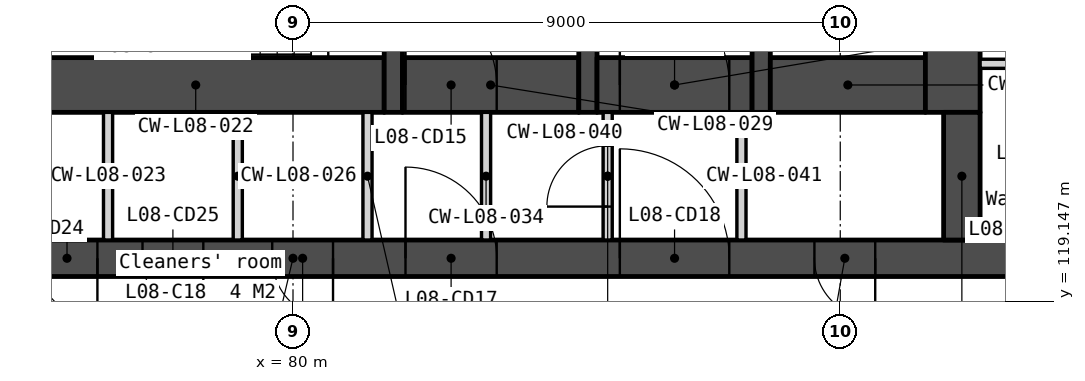
"""IFC4 building model, lengths in metres.
Left out: names, types, materials, properties, quantities, classifications, styles, units other than length and angle.
Written with IfcOpenShell. Run it as: python <this file> out.ifc"""

import sys

from ifc_helpers import new_model, si_unit, direction, frame, frame_2d, origin, place, context, subcontext, project, spatial, polyline, rectangle, outline, extrude, element, fill, save


model = new_model("IFC4")
c1 = context("Model", 3, precision=1e-05, world=origin(), true_north=direction((0.0, 1.0)))
c2 = subcontext(c1, "Body", "Model", "MODEL_VIEW")
j1 = project(units=[si_unit("LENGTHUNIT", "METRE"), si_unit("PLANEANGLEUNIT", "RADIAN")], contexts=[c1])
p1 = place(None, origin())
s1 = spatial("IfcSite", under=j1, at=p1, CompositionType="ELEMENT")
p2 = place(p1, origin())
s2 = spatial("IfcBuilding", under=s1, at=p2, CompositionType="ELEMENT")
p3 = place(p2, frame((0.0, 0.0, 42.0)))
s3 = spatial("IfcBuildingStorey", under=s2, at=p3, CompositionType="ELEMENT", Elevation=42.0)
p4 = place(p3, frame((66.0, 119.85, 0.0), z_axis=(0.0, 0.0, 1.0), x_axis=(1.0, 0.0, 0.0)))
e1 = element("IfcWall", 1, at=p4, inside=s3, PredefinedType="SOLIDWALL", context=c2, shape_type="SweptSolid", body=[
    extrude(rectangle(XDim=28.0, YDim=0.6, at=frame_2d((14.0, 0.0))), origin(), (0.0, 0.0, 1.0), 3.35),
])
p5 = place(p4, frame((6.825, 0.0, 0.0)))
e2 = element("IfcOpeningElement", 2, at=p5, cuts=e1, PredefinedType="OPENING", context=c2, shape_type="SweptSolid", body=[
    extrude(rectangle(XDim=1.8, YDim=2.1, at=frame_2d((0.9, 1.05))), frame((0.0, 0.31, 0.0), z_axis=(0.0, -1.0, 0.0), x_axis=(1.0, 0.0, 0.0)), (0.0, 0.0, 1.0), 0.62),
])
p6 = place(p4, frame((15.85, 0.0, 0.0)))
e3 = element("IfcOpeningElement", 3, at=p6, cuts=e1, PredefinedType="OPENING", context=c2, shape_type="SweptSolid", body=[
    extrude(rectangle(XDim=1.5, YDim=2.1, at=frame_2d((0.75, 1.05))), frame((0.0, 0.31, 0.0), z_axis=(0.0, -1.0, 0.0), x_axis=(1.0, 0.0, 0.0)), (0.0, 0.0, 1.0), 0.62),
])
p7 = place(p4, frame((19.375, 0.0, 0.0)))
e4 = element("IfcOpeningElement", 4, at=p7, cuts=e1, PredefinedType="OPENING", context=c2, shape_type="SweptSolid", body=[
    extrude(rectangle(XDim=1.8, YDim=2.1, at=frame_2d((0.9, 1.05))), frame((0.0, 0.31, 0.0), z_axis=(0.0, -1.0, 0.0), x_axis=(1.0, 0.0, 0.0)), (0.0, 0.0, 1.0), 0.62),
])
p8 = place(p4, frame((4.425, 0.0, 0.0)))
e5 = element("IfcOpeningElement", 5, at=p8, cuts=e1, PredefinedType="OPENING", context=c2, shape_type="SweptSolid", body=[
    extrude(rectangle(XDim=1.0, YDim=2.1, at=frame_2d((0.5, 1.05))), frame((0.0, 0.31, 0.0), z_axis=(0.0, -1.0, 0.0), x_axis=(1.0, 0.0, 0.0)), (0.0, 0.0, 1.0), 0.62),
])
p9 = place(p4, frame((9.783, 0.0, 0.0)))
e6 = element("IfcOpeningElement", 6, at=p9, cuts=e1, PredefinedType="OPENING", context=c2, shape_type="SweptSolid", body=[
    extrude(rectangle(XDim=1.0, YDim=2.1, at=frame_2d((0.5, 1.05))), frame((0.0, 0.31, 0.0), z_axis=(0.0, -1.0, 0.0), x_axis=(1.0, 0.0, 0.0)), (0.0, 0.0, 1.0), 0.62),
])
p10 = place(p4, frame((11.525, 0.0, 0.0)))
e7 = element("IfcOpeningElement", 7, at=p10, cuts=e1, PredefinedType="OPENING", context=c2, shape_type="SweptSolid", body=[
    extrude(rectangle(XDim=1.0, YDim=2.1, at=frame_2d((0.5, 1.05))), frame((0.0, 0.31, 0.0), z_axis=(0.0, -1.0, 0.0), x_axis=(1.0, 0.0, 0.0)), (0.0, 0.0, 1.0), 0.62),
])
p11 = place(p4, frame((13.658, 0.0, 0.0)))
e8 = element("IfcOpeningElement", 8, at=p11, cuts=e1, PredefinedType="OPENING", context=c2, shape_type="SweptSolid", body=[
    extrude(rectangle(XDim=1.0, YDim=2.1, at=frame_2d((0.5, 1.05))), frame((0.0, 0.31, 0.0), z_axis=(0.0, -1.0, 0.0), x_axis=(1.0, 0.0, 0.0)), (0.0, 0.0, 1.0), 0.62),
])
p12 = place(p4, frame((22.575, 0.0, 0.0)))
e9 = element("IfcOpeningElement", 9, at=p12, cuts=e1, PredefinedType="OPENING", context=c2, shape_type="SweptSolid", body=[
    extrude(rectangle(XDim=1.0, YDim=2.1, at=frame_2d((0.5, 1.05))), frame((0.0, 0.31, 0.0), z_axis=(0.0, -1.0, 0.0), x_axis=(1.0, 0.0, 0.0)), (0.0, 0.0, 1.0), 0.62),
])
p13 = place(p3, frame((75.3, 122.7, 0.0), z_axis=(0.0, 0.0, 1.0), x_axis=(1.0, 0.0, 0.0)))
e10 = element("IfcWall", 10, at=p13, inside=s3, PredefinedType="SOLIDWALL", context=c2, shape_type="SweptSolid", body=[
    extrude(rectangle(XDim=6.2, YDim=0.9, at=frame_2d((3.1, 0.0))), origin(), (0.0, 0.0, 1.0), 3.35),
])
for number, where, z_axis, x_axis in (
    (11, (76.958, 122.25, 0.0), (0.0, 0.0, 1.0), (0.0, -1.0, 0.0)),
    (12, (79.092, 122.25, 0.0), (0.0, 0.0, 1.0), (0.0, -1.0, 0.0)),
    (13, (81.225, 122.25, 0.0), (0.0, 0.0, 1.0), (0.0, -1.0, 0.0)),
):
    element("IfcWall", number, at=place(p3, frame(where, z_axis=z_axis, x_axis=x_axis)), inside=s3, PredefinedType="PARTITIONING", context=c2, shape_type="SweptSolid", body=[
        extrude(rectangle(XDim=2.1, YDim=0.15, at=frame_2d((1.05, 0.0))), origin(), (0.0, 0.0, 1.0), 3.35),
    ])
p14 = place(p3, frame((81.65, 125.7, 0.0), z_axis=(0.0, 0.0, 1.0), x_axis=(0.0, -1.0, 0.0)))
e14 = element("IfcWall", 14, at=p14, inside=s3, PredefinedType="SOLIDWALL", context=c2, shape_type="SweptSolid", body=[
    extrude(rectangle(XDim=3.45, YDim=0.3, at=frame_2d((1.725, 0.0))), origin(), (0.0, 0.0, 1.0), 3.35),
])
p15 = place(p14, frame((0.75, 0.0, 0.0)))
e15 = element("IfcOpeningElement", 15, at=p15, cuts=e14, PredefinedType="OPENING", context=c2, shape_type="SweptSolid", body=[
    extrude(rectangle(XDim=1.0, YDim=2.1, at=frame_2d((0.5, 1.05))), frame((0.0, 0.16, 0.0), z_axis=(0.0, -1.0, 0.0), x_axis=(1.0, 0.0, 0.0)), (0.0, 0.0, 1.0), 0.32),
])
p16 = place(p3, frame((81.8, 122.7, 0.0), z_axis=(0.0, 0.0, 1.0), x_axis=(1.0, 0.0, 0.0)))
e16 = element("IfcWall", 16, at=p16, inside=s3, PredefinedType="SOLIDWALL", context=c2, shape_type="SweptSolid", body=[
    extrude(rectangle(XDim=2.9, YDim=0.9, at=frame_2d((1.45, 0.0))), origin(), (0.0, 0.0, 1.0), 3.35),
])
p17 = place(p16, frame((0.05, 0.0, 0.0)))
e17 = element("IfcOpeningElement", 17, at=p17, cuts=e16, PredefinedType="OPENING", context=c2, shape_type="SweptSolid", body=[
    extrude(rectangle(XDim=1.5, YDim=2.1, at=frame_2d((0.75, 1.05))), frame((0.0, 0.46, 0.0), z_axis=(0.0, -1.0, 0.0), x_axis=(1.0, 0.0, 0.0)), (0.0, 0.0, 1.0), 0.92),
])
p18 = place(p3, frame((83.175, 122.25, 0.0), z_axis=(0.0, 0.0, 1.0), x_axis=(0.0, -1.0, 0.0)))
e18 = element("IfcWall", 18, at=p18, inside=s3, PredefinedType="PARTITIONING", context=c2, shape_type="SweptSolid", body=[
    extrude(rectangle(XDim=2.1, YDim=0.15, at=frame_2d((1.05, 0.0))), origin(), (0.0, 0.0, 1.0), 3.35),
])
p19 = place(p3, frame((84.85, 133.95, 0.0), z_axis=(0.0, 0.0, 1.0), x_axis=(0.0, -1.0, 0.0)))
e19 = element("IfcWall", 19, at=p19, inside=s3, PredefinedType="SOLIDWALL", context=c2, shape_type="SweptSolid", body=[
    extrude(rectangle(XDim=11.7, YDim=0.3, at=frame_2d((5.85, 0.0))), origin(), (0.0, 0.0, 1.0), 3.35),
])
p20 = place(p3, frame((85.0, 122.7, 0.0), z_axis=(0.0, 0.0, 1.0), x_axis=(1.0, 0.0, 0.0)))
e20 = element("IfcWall", 20, at=p20, inside=s3, PredefinedType="SOLIDWALL", context=c2, shape_type="SweptSolid", body=[
    extrude(rectangle(XDim=2.55, YDim=0.9, at=frame_2d((1.275, 0.0))), origin(), (0.0, 0.0, 1.0), 3.35),
])
p21 = place(p20, frame((0.375, 0.0, 0.0)))
e21 = element("IfcOpeningElement", 21, at=p21, cuts=e20, PredefinedType="OPENING", context=c2, shape_type="SweptSolid", body=[
    extrude(rectangle(XDim=1.8, YDim=2.1, at=frame_2d((0.9, 1.05))), frame((0.0, 0.46, 0.0), z_axis=(0.0, -1.0, 0.0), x_axis=(1.0, 0.0, 0.0)), (0.0, 0.0, 1.0), 0.92),
])
p22 = place(p3, frame((85.175, 122.25, 0.0), z_axis=(0.0, 0.0, 1.0), x_axis=(0.0, -1.0, 0.0)))
e22 = element("IfcWall", 22, at=p22, inside=s3, PredefinedType="PARTITIONING", context=c2, shape_type="SweptSolid", body=[
    extrude(rectangle(XDim=2.1, YDim=0.15, at=frame_2d((1.05, 0.0))), origin(), (0.0, 0.0, 1.0), 3.35),
])
p23 = place(p22, frame((0.55, 0.0, 0.0)))
e23 = element("IfcOpeningElement", 23, at=p23, cuts=e22, PredefinedType="OPENING", context=c2, shape_type="SweptSolid", body=[
    extrude(rectangle(XDim=1.0, YDim=2.1, at=frame_2d((0.5, 1.05))), frame((0.0, 0.085, 0.0), z_axis=(0.0, -1.0, 0.0), x_axis=(1.0, 0.0, 0.0)), (0.0, 0.0, 1.0), 0.17),
])
p24 = place(p3, frame((87.375, 122.25, 0.0), z_axis=(0.0, 0.0, 1.0), x_axis=(0.0, -1.0, 0.0)))
e24 = element("IfcWall", 24, at=p24, inside=s3, PredefinedType="PARTITIONING", context=c2, shape_type="SweptSolid", body=[
    extrude(rectangle(XDim=2.1, YDim=0.15, at=frame_2d((1.05, 0.0))), origin(), (0.0, 0.0, 1.0), 3.35),
])
p25 = place(p3, frame((87.7, 133.95, 0.0), z_axis=(0.0, 0.0, 1.0), x_axis=(0.0, -1.0, 0.0)))
e25 = element("IfcWall", 25, at=p25, inside=s3, PredefinedType="SOLIDWALL", context=c2, shape_type="SweptSolid", body=[
    extrude(rectangle(XDim=11.7, YDim=0.3, at=frame_2d((5.85, 0.0))), origin(), (0.0, 0.0, 1.0), 3.35),
])
p26 = place(p25, frame((6.95, 0.0, 0.0)))
e26 = element("IfcOpeningElement", 26, at=p26, cuts=e25, PredefinedType="OPENING", context=c2, shape_type="SweptSolid", body=[
    extrude(rectangle(XDim=1.1, YDim=2.1, at=frame_2d((0.55, 1.05))), frame((0.0, 0.16, 0.0), z_axis=(0.0, -1.0, 0.0), x_axis=(1.0, 0.0, 0.0)), (0.0, 0.0, 1.0), 0.32),
])
p27 = place(p25, frame((5.1, 0.0, 0.0)))
e27 = element("IfcOpeningElement", 27, at=p27, cuts=e25, PredefinedType="OPENING", context=c2, shape_type="SweptSolid", body=[
    extrude(rectangle(XDim=1.0, YDim=2.1, at=frame_2d((0.5, 1.05))), frame((0.0, 0.16, 0.0), z_axis=(0.0, -1.0, 0.0), x_axis=(1.0, 0.0, 0.0)), (0.0, 0.0, 1.0), 0.32),
])
p28 = place(p25, frame((9.25, 0.0, 0.0)))
e28 = element("IfcOpeningElement", 28, at=p28, cuts=e25, PredefinedType="OPENING", context=c2, shape_type="SweptSolid", body=[
    extrude(rectangle(XDim=1.1, YDim=2.1, at=frame_2d((0.55, 1.05))), frame((0.0, 0.16, 0.0), z_axis=(0.0, -1.0, 0.0), x_axis=(1.0, 0.0, 0.0)), (0.0, 0.0, 1.0), 0.32),
])
p29 = place(p3, frame((87.85, 122.7, 0.0), z_axis=(0.0, 0.0, 1.0), x_axis=(1.0, 0.0, 0.0)))
e29 = element("IfcWall", 29, at=p29, inside=s3, PredefinedType="SOLIDWALL", context=c2, shape_type="SweptSolid", body=[
    extrude(rectangle(XDim=2.55, YDim=0.9, at=frame_2d((1.275, 0.0))), origin(), (0.0, 0.0, 1.0), 3.35),
])
p30 = place(p3, frame((90.85, 133.95, 0.0), z_axis=(0.0, 0.0, 1.0), x_axis=(0.0, -1.0, 0.0)))
e30 = element("IfcWall", 30, at=p30, inside=s3, PredefinedType="SOLIDWALL", context=c2, shape_type="SweptSolid", body=[
    extrude(rectangle(XDim=11.7, YDim=0.9, at=frame_2d((5.85, 0.0))), origin(), (0.0, 0.0, 1.0), 3.35),
])
p31 = place(p3, frame((91.0, 122.25, 0.0), z_axis=(0.0, 0.0, 1.0), x_axis=(0.0, -1.0, 0.0)))
e31 = element("IfcWall", 31, at=p31, inside=s3, PredefinedType="SOLIDWALL", context=c2, shape_type="SweptSolid", body=[
    extrude(rectangle(XDim=2.1, YDim=0.6, at=frame_2d((1.05, 0.0))), origin(), (0.0, 0.0, 1.0), 3.35),
])
p32 = place(p3, frame((91.3, 123.049, 0.0), z_axis=(0.0, 0.0, 1.0), x_axis=(1.0, 0.0, 0.0)))
e32 = element("IfcWall", 32, at=p32, inside=s3, PredefinedType="PARTITIONING", context=c2, shape_type="SweptSolid", body=[
    extrude(rectangle(XDim=2.1, YDim=0.15, at=frame_2d((1.05, 0.0))), origin(), (0.0, 0.0, 1.0), 3.35),
])
p33 = place(p3, frame((54.495, 129.397, -0.15), z_axis=(0.0, 0.0, 1.0), x_axis=(0.499999201451, -0.866025864826, 0.0)))
e33 = element("IfcWall", 33, at=p33, inside=s3, PredefinedType="SOLIDWALL", context=c2, shape_type="SweptSolid", body=[
    extrude(outline(polyline([(44.8, 0.0), (44.8, 3.5), (0.0, 3.5), (0.0, 0.0), (44.8, 0.0)])), frame((0.0, 0.225, 0.0), z_axis=(0.0, -1.0, 0.0), x_axis=(1.0, 0.0, 0.0)), (0.0, 0.0, 1.0), 0.45),
])
p34 = place(p33, frame((0.786, 0.0, 1.05)))
e34 = element("IfcOpeningElement", 34, at=p34, cuts=e33, PredefinedType="OPENING", context=c2, shape_type="SweptSolid", body=[
    extrude(rectangle(XDim=1.2, YDim=1.5, at=frame_2d((0.6, 0.75))), frame((0.0, 0.235, 0.0), z_axis=(0.0, -1.0, 0.0), x_axis=(1.0, 0.0, 0.0)), (0.0, 0.0, 1.0), 0.47),
])
p35 = place(p33, frame((6.91, 0.0, 1.05)))
e35 = element("IfcOpeningElement", 35, at=p35, cuts=e33, PredefinedType="OPENING", context=c2, shape_type="SweptSolid", body=[
    extrude(rectangle(XDim=1.8, YDim=1.5, at=frame_2d((0.9, 0.75))), frame((0.0, 0.235, 0.0), z_axis=(0.0, -1.0, 0.0), x_axis=(1.0, 0.0, 0.0)), (0.0, 0.0, 1.0), 0.47),
])
p36 = place(p33, frame((9.21, 0.0, 1.05)))
e36 = element("IfcOpeningElement", 36, at=p36, cuts=e33, PredefinedType="OPENING", context=c2, shape_type="SweptSolid", body=[
    extrude(rectangle(XDim=1.8, YDim=1.5, at=frame_2d((0.9, 0.75))), frame((0.0, 0.235, 0.0), z_axis=(0.0, -1.0, 0.0), x_axis=(1.0, 0.0, 0.0)), (0.0, 0.0, 1.0), 0.47),
])
p37 = place(p33, frame((15.87, 0.0, 1.05)))
e37 = element("IfcOpeningElement", 37, at=p37, cuts=e33, PredefinedType="OPENING", context=c2, shape_type="SweptSolid", body=[
    extrude(rectangle(XDim=1.8, YDim=1.5, at=frame_2d((0.9, 0.75))), frame((0.0, 0.235, 0.0), z_axis=(0.0, -1.0, 0.0), x_axis=(1.0, 0.0, 0.0)), (0.0, 0.0, 1.0), 0.47),
])
p38 = place(p33, frame((18.17, 0.0, 1.05)))
e38 = element("IfcOpeningElement", 38, at=p38, cuts=e33, PredefinedType="OPENING", context=c2, shape_type="SweptSolid", body=[
    extrude(rectangle(XDim=1.8, YDim=1.5, at=frame_2d((0.9, 0.75))), frame((0.0, 0.235, 0.0), z_axis=(0.0, -1.0, 0.0), x_axis=(1.0, 0.0, 0.0)), (0.0, 0.0, 1.0), 0.47),
])
p39 = place(p33, frame((24.83, 0.0, 1.05)))
e39 = element("IfcOpeningElement", 39, at=p39, cuts=e33, PredefinedType="OPENING", context=c2, shape_type="SweptSolid", body=[
    extrude(rectangle(XDim=1.8, YDim=1.5, at=frame_2d((0.9, 0.75))), frame((0.0, 0.235, 0.0), z_axis=(0.0, -1.0, 0.0), x_axis=(1.0, 0.0, 0.0)), (0.0, 0.0, 1.0), 0.47),
])
p40 = place(p33, frame((27.13, 0.0, 1.05)))
e40 = element("IfcOpeningElement", 40, at=p40, cuts=e33, PredefinedType="OPENING", context=c2, shape_type="SweptSolid", body=[
    extrude(rectangle(XDim=1.8, YDim=1.5, at=frame_2d((0.9, 0.75))), frame((0.0, 0.235, 0.0), z_axis=(0.0, -1.0, 0.0), x_axis=(1.0, 0.0, 0.0)), (0.0, 0.0, 1.0), 0.47),
])
p41 = place(p33, frame((33.79, 0.0, 1.05)))
e41 = element("IfcOpeningElement", 41, at=p41, cuts=e33, PredefinedType="OPENING", context=c2, shape_type="SweptSolid", body=[
    extrude(rectangle(XDim=1.8, YDim=1.5, at=frame_2d((0.9, 0.75))), frame((0.0, 0.235, 0.0), z_axis=(0.0, -1.0, 0.0), x_axis=(1.0, 0.0, 0.0)), (0.0, 0.0, 1.0), 0.47),
])
p42 = place(p33, frame((36.09, 0.0, 1.05)))
e42 = element("IfcOpeningElement", 42, at=p42, cuts=e33, PredefinedType="OPENING", context=c2, shape_type="SweptSolid", body=[
    extrude(rectangle(XDim=1.8, YDim=1.5, at=frame_2d((0.9, 0.75))), frame((0.0, 0.235, 0.0), z_axis=(0.0, -1.0, 0.0), x_axis=(1.0, 0.0, 0.0)), (0.0, 0.0, 1.0), 0.47),
])
p43 = place(p33, frame((42.814, 0.0, 1.05)))
e43 = element("IfcOpeningElement", 43, at=p43, cuts=e33, PredefinedType="OPENING", context=c2, shape_type="SweptSolid", body=[
    extrude(rectangle(XDim=1.2, YDim=1.5, at=frame_2d((0.6, 0.75))), frame((0.0, 0.235, 0.0), z_axis=(0.0, -1.0, 0.0), x_axis=(1.0, 0.0, 0.0)), (0.0, 0.0, 1.0), 0.47),
])
p44 = place(p3, frame((83.105, 90.599, -0.15), z_axis=(0.0, 0.0, 1.0), x_axis=(0.499999201451, 0.866025864826, 0.0)))
e44 = element("IfcWall", 44, at=p44, inside=s3, PredefinedType="SOLIDWALL", context=c2, shape_type="SweptSolid", body=[
    extrude(outline(polyline([(44.8, 0.0), (44.8, 3.5), (0.0, 3.5), (0.0, 0.0), (44.8, 0.0)])), frame((0.0, 0.225, 0.0), z_axis=(0.0, -1.0, 0.0), x_axis=(1.0, 0.0, 0.0)), (0.0, 0.0, 1.0), 0.45),
])
p45 = place(p44, frame((0.786, 0.0, 1.05)))
e45 = element("IfcOpeningElement", 45, at=p45, cuts=e44, PredefinedType="OPENING", context=c2, shape_type="SweptSolid", body=[
    extrude(rectangle(XDim=1.2, YDim=1.5, at=frame_2d((0.6, 0.75))), frame((0.0, 0.235, 0.0), z_axis=(0.0, -1.0, 0.0), x_axis=(1.0, 0.0, 0.0)), (0.0, 0.0, 1.0), 0.47),
])
p46 = place(p44, frame((6.91, 0.0, 1.05)))
e46 = element("IfcOpeningElement", 46, at=p46, cuts=e44, PredefinedType="OPENING", context=c2, shape_type="SweptSolid", body=[
    extrude(rectangle(XDim=1.8, YDim=1.5, at=frame_2d((0.9, 0.75))), frame((0.0, 0.235, 0.0), z_axis=(0.0, -1.0, 0.0), x_axis=(1.0, 0.0, 0.0)), (0.0, 0.0, 1.0), 0.47),
])
p47 = place(p44, frame((9.21, 0.0, 1.05)))
e47 = element("IfcOpeningElement", 47, at=p47, cuts=e44, PredefinedType="OPENING", context=c2, shape_type="SweptSolid", body=[
    extrude(rectangle(XDim=1.8, YDim=1.5, at=frame_2d((0.9, 0.75))), frame((0.0, 0.235, 0.0), z_axis=(0.0, -1.0, 0.0), x_axis=(1.0, 0.0, 0.0)), (0.0, 0.0, 1.0), 0.47),
])
p48 = place(p44, frame((15.87, 0.0, 1.05)))
e48 = element("IfcOpeningElement", 48, at=p48, cuts=e44, PredefinedType="OPENING", context=c2, shape_type="SweptSolid", body=[
    extrude(rectangle(XDim=1.8, YDim=1.5, at=frame_2d((0.9, 0.75))), frame((0.0, 0.235, 0.0), z_axis=(0.0, -1.0, 0.0), x_axis=(1.0, 0.0, 0.0)), (0.0, 0.0, 1.0), 0.47),
])
p49 = place(p44, frame((18.17, 0.0, 1.05)))
e49 = element("IfcOpeningElement", 49, at=p49, cuts=e44, PredefinedType="OPENING", context=c2, shape_type="SweptSolid", body=[
    extrude(rectangle(XDim=1.8, YDim=1.5, at=frame_2d((0.9, 0.75))), frame((0.0, 0.235, 0.0), z_axis=(0.0, -1.0, 0.0), x_axis=(1.0, 0.0, 0.0)), (0.0, 0.0, 1.0), 0.47),
])
p50 = place(p44, frame((24.83, 0.0, 1.05)))
e50 = element("IfcOpeningElement", 50, at=p50, cuts=e44, PredefinedType="OPENING", context=c2, shape_type="SweptSolid", body=[
    extrude(rectangle(XDim=1.8, YDim=1.5, at=frame_2d((0.9, 0.75))), frame((0.0, 0.235, 0.0), z_axis=(0.0, -1.0, 0.0), x_axis=(1.0, 0.0, 0.0)), (0.0, 0.0, 1.0), 0.47),
])
p51 = place(p44, frame((27.13, 0.0, 1.05)))
e51 = element("IfcOpeningElement", 51, at=p51, cuts=e44, PredefinedType="OPENING", context=c2, shape_type="SweptSolid", body=[
    extrude(rectangle(XDim=1.8, YDim=1.5, at=frame_2d((0.9, 0.75))), frame((0.0, 0.235, 0.0), z_axis=(0.0, -1.0, 0.0), x_axis=(1.0, 0.0, 0.0)), (0.0, 0.0, 1.0), 0.47),
])
p52 = place(p44, frame((33.79, 0.0, 1.05)))
e52 = element("IfcOpeningElement", 52, at=p52, cuts=e44, PredefinedType="OPENING", context=c2, shape_type="SweptSolid", body=[
    extrude(rectangle(XDim=1.8, YDim=1.5, at=frame_2d((0.9, 0.75))), frame((0.0, 0.235, 0.0), z_axis=(0.0, -1.0, 0.0), x_axis=(1.0, 0.0, 0.0)), (0.0, 0.0, 1.0), 0.47),
])
p53 = place(p44, frame((36.09, 0.0, 1.05)))
e53 = element("IfcOpeningElement", 53, at=p53, cuts=e44, PredefinedType="OPENING", context=c2, shape_type="SweptSolid", body=[
    extrude(rectangle(XDim=1.8, YDim=1.5, at=frame_2d((0.9, 0.75))), frame((0.0, 0.235, 0.0), z_axis=(0.0, -1.0, 0.0), x_axis=(1.0, 0.0, 0.0)), (0.0, 0.0, 1.0), 0.47),
])
p54 = place(p44, frame((42.814, 0.0, 1.05)))
e54 = element("IfcOpeningElement", 54, at=p54, cuts=e44, PredefinedType="OPENING", context=c2, shape_type="SweptSolid", body=[
    extrude(rectangle(XDim=1.2, YDim=1.5, at=frame_2d((0.6, 0.75))), frame((0.0, 0.235, 0.0), z_axis=(0.0, -1.0, 0.0), x_axis=(1.0, 0.0, 0.0)), (0.0, 0.0, 1.0), 0.47),
])
p55 = place(p21, origin())
e55 = element("IfcDoor", 55, at=p55, inside=s3, OperationType="DOUBLE_DOOR_DOUBLE_SWING", PredefinedType="DOOR", context=c2, shape_type="SweptSolid", body=[
    extrude(rectangle(XDim=1.8, YDim=2.1, at=frame_2d((0.9, 1.05))), frame((0.0, 0.025, 0.0), z_axis=(0.0, -1.0, 0.0), x_axis=(1.0, 0.0, 0.0)), (0.0, 0.0, 1.0), 0.05),
])
fill(e21, e55)
p56 = place(p17, origin())
e56 = element("IfcDoor", 56, at=p56, inside=s3, OperationType="DOUBLE_DOOR_DOUBLE_SWING", PredefinedType="DOOR", context=c2, shape_type="SweptSolid", body=[
    extrude(rectangle(XDim=1.5, YDim=2.1, at=frame_2d((0.75, 1.05))), frame((0.0, 0.025, 0.0), z_axis=(0.0, -1.0, 0.0), x_axis=(1.0, 0.0, 0.0)), (0.0, 0.0, 1.0), 0.05),
])
fill(e17, e56)
p57 = place(p6, origin())
e57 = element("IfcDoor", 57, at=p57, inside=s3, OperationType="DOUBLE_DOOR_DOUBLE_SWING", PredefinedType="DOOR", context=c2, shape_type="SweptSolid", body=[
    extrude(rectangle(XDim=1.5, YDim=2.1, at=frame_2d((0.75, 1.05))), frame((0.0, 0.025, 0.0), z_axis=(0.0, -1.0, 0.0), x_axis=(1.0, 0.0, 0.0)), (0.0, 0.0, 1.0), 0.05),
])
fill(e3, e57)
p58 = place(p7, origin())
e58 = element("IfcDoor", 58, at=p58, inside=s3, OperationType="DOUBLE_DOOR_DOUBLE_SWING", PredefinedType="DOOR", context=c2, shape_type="SweptSolid", body=[
    extrude(rectangle(XDim=1.8, YDim=2.1, at=frame_2d((0.9, 1.05))), frame((0.0, 0.025, 0.0), z_axis=(0.0, -1.0, 0.0), x_axis=(1.0, 0.0, 0.0)), (0.0, 0.0, 1.0), 0.05),
])
fill(e4, e58)
p59 = place(p9, origin())
e59 = element("IfcDoor", 59, at=p59, inside=s3, OperationType="SINGLE_SWING_RIGHT", PredefinedType="DOOR", context=c2, shape_type="SweptSolid", body=[
    extrude(rectangle(XDim=1.0, YDim=2.1, at=frame_2d((0.5, 1.05))), frame((0.0, 0.025, 0.0), z_axis=(0.0, -1.0, 0.0), x_axis=(1.0, 0.0, 0.0)), (0.0, 0.0, 1.0), 0.05),
])
fill(e6, e59)
p60 = place(p10, origin())
e60 = element("IfcDoor", 60, at=p60, inside=s3, OperationType="SINGLE_SWING_RIGHT", PredefinedType="DOOR", context=c2, shape_type="SweptSolid", body=[
    extrude(rectangle(XDim=1.0, YDim=2.1, at=frame_2d((0.5, 1.05))), frame((0.0, 0.025, 0.0), z_axis=(0.0, -1.0, 0.0), x_axis=(1.0, 0.0, 0.0)), (0.0, 0.0, 1.0), 0.05),
])
fill(e7, e60)
p61 = place(p11, origin())
e61 = element("IfcDoor", 61, at=p61, inside=s3, OperationType="SINGLE_SWING_RIGHT", PredefinedType="DOOR", context=c2, shape_type="SweptSolid", body=[
    extrude(rectangle(XDim=1.0, YDim=2.1, at=frame_2d((0.5, 1.05))), frame((0.0, 0.025, 0.0), z_axis=(0.0, -1.0, 0.0), x_axis=(1.0, 0.0, 0.0)), (0.0, 0.0, 1.0), 0.05),
])
fill(e8, e61)
p62 = place(p23, origin())
e62 = element("IfcDoor", 62, at=p62, inside=s3, OperationType="SINGLE_SWING_RIGHT", PredefinedType="DOOR", context=c2, shape_type="SweptSolid", body=[
    extrude(rectangle(XDim=1.0, YDim=2.1, at=frame_2d((0.5, 1.05))), frame((0.0, 0.025, 0.0), z_axis=(0.0, -1.0, 0.0), x_axis=(1.0, 0.0, 0.0)), (0.0, 0.0, 1.0), 0.05),
])
fill(e23, e62)
p63 = place(p12, origin())
e63 = element("IfcDoor", 63, at=p63, inside=s3, OperationType="SINGLE_SWING_RIGHT", PredefinedType="DOOR", context=c2, shape_type="SweptSolid", body=[
    extrude(rectangle(XDim=1.0, YDim=2.1, at=frame_2d((0.5, 1.05))), frame((0.0, 0.025, 0.0), z_axis=(0.0, -1.0, 0.0), x_axis=(1.0, 0.0, 0.0)), (0.0, 0.0, 1.0), 0.05),
])
fill(e9, e63)
save(model, sys.argv[1])
